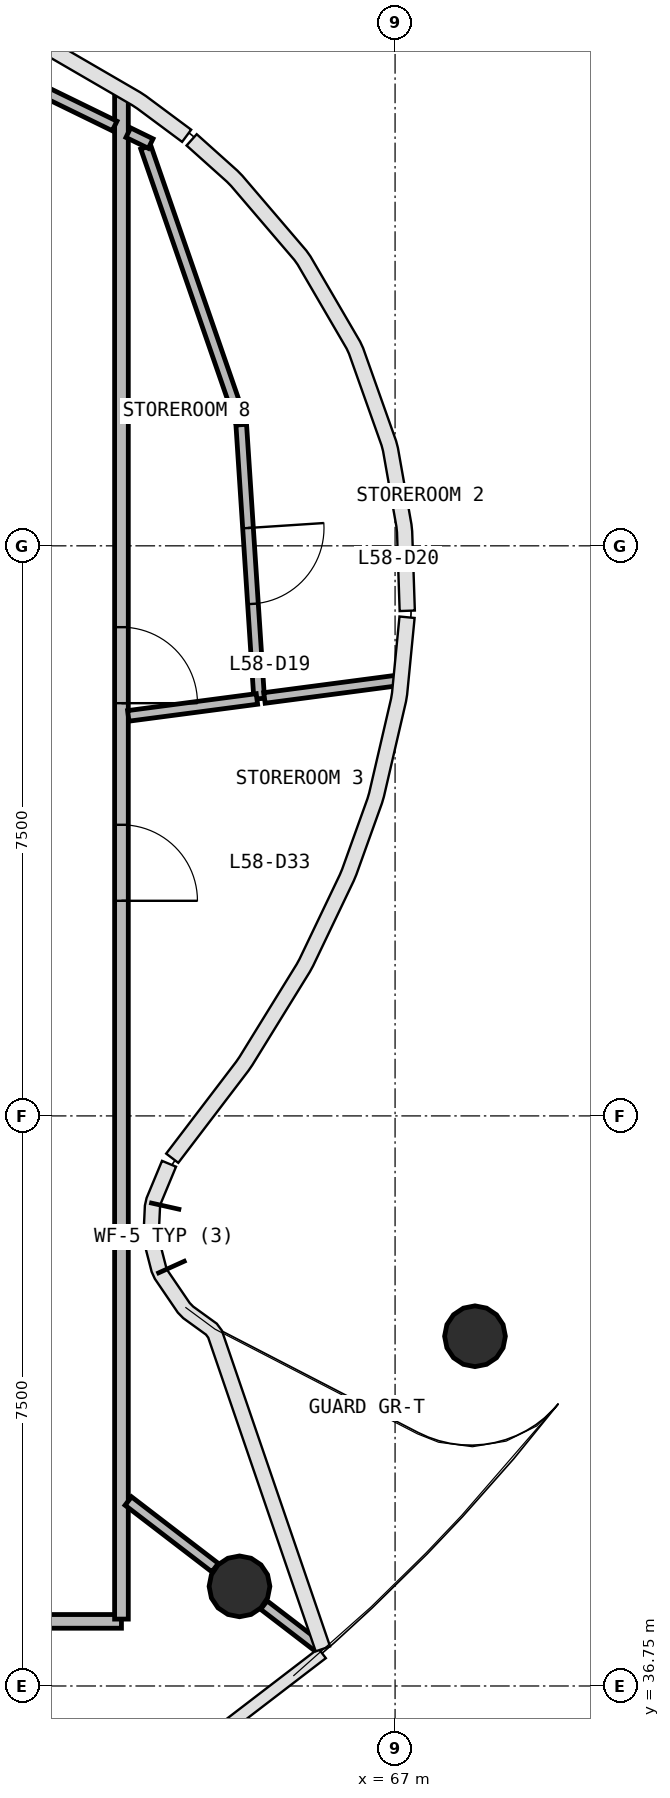
"""IFC4 building model, lengths in metres.
Left out: names, types, materials, properties, quantities, classifications, styles, units other than length and angle.
Written with IfcOpenShell. Run it as: python <this file> out.ifc"""

import sys

from ifc_helpers import new_model, si_unit, direction, frame, frame_2d, origin, origin_2d, place, context, subcontext, project, spatial, rectangle, circle, extrude, source, transform, mapped, element, fill, save


model = new_model("IFC4")
c1 = context("Model", 3, precision=1e-05, world=origin(), true_north=direction((0.0, 1.0)))
c2 = subcontext(c1, "Body", "Model", "MODEL_VIEW")
j1 = project(units=[si_unit("LENGTHUNIT", "METRE"), si_unit("PLANEANGLEUNIT", "RADIAN")], contexts=[c1])
p1 = place(None, origin())
s1 = spatial("IfcSite", under=j1, at=p1, CompositionType="ELEMENT")
p2 = place(p1, origin())
s2 = spatial("IfcBuilding", under=s1, at=p2, CompositionType="ELEMENT")
p3 = place(p2, frame((0.0, 0.0, 238.4)))
s3 = spatial("IfcBuildingStorey", under=s2, at=p3, CompositionType="ELEMENT", Elevation=238.4)
m1 = source(origin(), c2, "Body", "SweptSolid", [
    extrude(circle(Radius=0.4, at=origin_2d()), origin(), (0.0, 0.0, 1.0), 3.9),
])
for number, where, z_axis, x_axis in (
    (1, (64.953, 38.061, 0.0), (0.0, 0.0, 1.0), (1.0, 0.0, 0.0)),
    (2, (68.052, 41.351, 0.0), (0.0, 0.0, 1.0), (1.0, 0.0, 0.0)),
):
    element("IfcColumn", number, at=place(p3, frame(where, z_axis=z_axis, x_axis=x_axis)), inside=s3, PredefinedType="COLUMN", context=c2, shape_type="MappedRepresentation", body=[
        mapped(m1, transform((0.0, 0.0, 0.0), scale=1.0)),
    ])
p4 = place(p3, frame((63.4, 37.6, 0.0), z_axis=(0.0, 0.0, 1.0), x_axis=(-1.0, 0.0, 0.0)))
e3 = element("IfcWall", 3, at=p4, inside=s3, PredefinedType="PARTITIONING", context=c2, shape_type="SweptSolid", body=[
    extrude(rectangle(XDim=22.8, YDim=0.18, at=frame_2d((11.4, 0.0))), origin(), (0.0, 0.0, 1.0), 2.88),
])
p5 = place(p4, frame((12.95, 0.0, 0.0)))
e4 = element("IfcOpeningElement", 4, at=p5, cuts=e3, PredefinedType="OPENING", context=c2, shape_type="SweptSolid", body=[
    extrude(rectangle(XDim=1.0, YDim=2.1, at=frame_2d((0.5, 1.05))), frame((0.0, 0.1, 0.0), z_axis=(0.0, -1.0, 0.0), x_axis=(1.0, 0.0, 0.0)), (0.0, 0.0, 1.0), 0.2),
])
p6 = place(p4, frame((10.95, 0.0, 0.0)))
e5 = element("IfcOpeningElement", 5, at=p6, cuts=e3, PredefinedType="OPENING", context=c2, shape_type="SweptSolid", body=[
    extrude(rectangle(XDim=1.0, YDim=2.1, at=frame_2d((0.5, 1.05))), frame((0.0, 0.1, 0.0), z_axis=(0.0, -1.0, 0.0), x_axis=(1.0, 0.0, 0.0)), (0.0, 0.0, 1.0), 0.2),
])
p7 = place(p4, frame((5.75, 0.0, 0.0)))
e6 = element("IfcOpeningElement", 6, at=p7, cuts=e3, PredefinedType="OPENING", context=c2, shape_type="SweptSolid", body=[
    extrude(rectangle(XDim=1.0, YDim=2.1, at=frame_2d((0.5, 1.05))), frame((0.0, 0.1, 0.0), z_axis=(0.0, -1.0, 0.0), x_axis=(1.0, 0.0, 0.0)), (0.0, 0.0, 1.0), 0.2),
])
p8 = place(p3, frame((63.4, 57.687, 0.0), z_axis=(0.0, 0.0, 1.0), x_axis=(0.0, -1.0, 0.0)))
e7 = element("IfcWall", 7, at=p8, inside=s3, PredefinedType="PARTITIONING", context=c2, shape_type="SweptSolid", body=[
    extrude(rectangle(XDim=20.057, YDim=0.18, at=frame_2d((10.028, 0.0))), origin(), (0.0, 0.0, 1.0), 2.88),
])
p9 = place(p8, frame((7.007, 0.0, 0.0)))
e8 = element("IfcOpeningElement", 8, at=p9, cuts=e7, PredefinedType="OPENING", context=c2, shape_type="SweptSolid", body=[
    extrude(rectangle(XDim=1.0, YDim=2.1, at=frame_2d((0.5, 1.05))), frame((0.0, 0.1, 0.0), z_axis=(0.0, -1.0, 0.0), x_axis=(1.0, 0.0, 0.0)), (0.0, 0.0, 1.0), 0.2),
])
p10 = place(p8, frame((9.607, 0.0, 0.0)))
e9 = element("IfcOpeningElement", 9, at=p10, cuts=e7, PredefinedType="OPENING", context=c2, shape_type="SweptSolid", body=[
    extrude(rectangle(XDim=1.0, YDim=2.1, at=frame_2d((0.5, 1.05))), frame((0.0, 0.1, 0.0), z_axis=(0.0, -1.0, 0.0), x_axis=(1.0, 0.0, 0.0)), (0.0, 0.0, 1.0), 0.2),
])
p11 = place(p3, frame((64.974, 53.374, 0.0), z_axis=(0.0, 0.0, 1.0), x_axis=(-0.327353545352, 0.944901929486, 0.0)))
e10 = element("IfcWall", 10, at=p11, inside=s3, PredefinedType="PARTITIONING", context=c2, shape_type="SweptSolid", body=[
    extrude(rectangle(XDim=3.83, YDim=0.14, at=frame_2d((1.915, 0.0))), origin(), (0.0, 0.0, 1.0), 2.88),
])
p12 = place(p3, frame((64.976, 53.344, 0.0), z_axis=(0.0, 0.0, 1.0), x_axis=(0.065289819009, -0.997866343522, 0.0)))
e11 = element("IfcWall", 11, at=p12, inside=s3, PredefinedType="PARTITIONING", context=c2, shape_type="SweptSolid", body=[
    extrude(rectangle(XDim=3.612, YDim=0.14, at=frame_2d((1.806, 0.0))), origin(), (0.0, 0.0, 1.0), 2.88),
])
p13 = place(p12, frame((1.362, 0.0, 0.0)))
e12 = element("IfcOpeningElement", 12, at=p13, cuts=e11, PredefinedType="OPENING", context=c2, shape_type="SweptSolid", body=[
    extrude(rectangle(XDim=1.0, YDim=2.1, at=frame_2d((0.5, 1.05))), frame((0.0, 0.08, 0.0), z_axis=(0.0, -1.0, 0.0), x_axis=(1.0, 0.0, 0.0)), (0.0, 0.0, 1.0), 0.16),
])
p14 = place(p3, frame((63.31, 57.274, 0.0), z_axis=(0.0, 0.0, 1.0), x_axis=(-0.898704875961, 0.438553925903, 0.0)))
e13 = element("IfcWall", 13, at=p14, inside=s3, PredefinedType="PARTITIONING", context=c2, shape_type="SweptSolid", body=[
    extrude(rectangle(XDim=2.363, YDim=0.14, at=frame_2d((1.181, 0.0))), origin(), (0.0, 0.0, 1.0), 2.88),
])
p15 = place(p3, frame((65.281, 49.749, 0.0), z_axis=(0.0, 0.0, 1.0), x_axis=(0.991453349724, 0.130461700587, 0.0)))
e14 = element("IfcWall", 14, at=p15, inside=s3, PredefinedType="PARTITIONING", context=c2, shape_type="SweptSolid", body=[
    extrude(rectangle(XDim=1.757, YDim=0.14, at=frame_2d((0.879, 0.0))), origin(), (0.0, 0.0, 1.0), 2.88),
])
p16 = place(p3, frame((63.49, 49.513, 0.0), z_axis=(0.0, 0.0, 1.0), x_axis=(0.99143529695, 0.130598820677, 0.0)))
e15 = element("IfcWall", 15, at=p16, inside=s3, PredefinedType="PARTITIONING", context=c2, shape_type="SweptSolid", body=[
    extrude(rectangle(XDim=1.707, YDim=0.14, at=frame_2d((0.854, 0.0))), origin(), (0.0, 0.0, 1.0), 2.88),
])
p17 = place(p3, frame((63.49, 39.183, 0.0), z_axis=(0.0, 0.0, 1.0), x_axis=(0.793316945216, -0.608808857059, 0.0)))
e16 = element("IfcWall", 16, at=p17, inside=s3, PredefinedType="PARTITIONING", context=c2, shape_type="SweptSolid", body=[
    extrude(rectangle(XDim=1.44, YDim=0.14, at=frame_2d((0.72, 0.0))), origin(), (0.0, 0.0, 1.0), 2.88),
])
p18 = place(p3, frame((65.274, 37.814, 0.0), z_axis=(0.0, 0.0, 1.0), x_axis=(0.793377017635, -0.608730570851, 0.0)))
e17 = element("IfcWall", 17, at=p18, inside=s3, PredefinedType="PARTITIONING", context=c2, shape_type="SweptSolid", body=[
    extrude(rectangle(XDim=0.891, YDim=0.14, at=frame_2d((0.446, 0.0))), origin(), (0.0, 0.0, 1.0), 2.88),
])
p19 = place(p3, frame((63.784, 57.042, 0.0), z_axis=(0.0, 0.0, 1.0), x_axis=(-0.898711094884, 0.43854118157, 0.0)))
e18 = element("IfcWall", 18, at=p19, inside=s3, PredefinedType="PARTITIONING", context=c2, shape_type="SweptSolid", body=[
    extrude(rectangle(XDim=0.327, YDim=0.14, at=frame_2d((0.164, 0.0))), origin(), (0.0, 0.0, 1.0), 2.88),
])
m2 = source(origin(), c2, "Body", "SweptSolid", [
    extrude(rectangle(XDim=1.0, YDim=2.1, at=frame_2d((0.5, 1.05))), frame((0.0, 0.025, 0.0), z_axis=(0.0, -1.0, 0.0), x_axis=(1.0, 0.0, 0.0)), (0.0, 0.0, 1.0), 0.05),
])
p20 = place(p9, origin())
e19 = element("IfcDoor", 19, at=p20, inside=s3, OperationType="SINGLE_SWING_RIGHT", PredefinedType="DOOR", context=c2, shape_type="MappedRepresentation", body=[
    mapped(m2, transform((0.0, 0.0, 0.0), scale=1.0)),
])
fill(e8, e19)
p21 = place(p13, origin())
e20 = element("IfcDoor", 20, at=p21, inside=s3, OperationType="SINGLE_SWING_LEFT", PredefinedType="DOOR", context=c2, shape_type="MappedRepresentation", body=[
    mapped(m2, transform((0.0, 0.0, 0.0), scale=1.0)),
])
fill(e12, e20)
p22 = place(p10, origin())
e21 = element("IfcDoor", 21, at=p22, inside=s3, OperationType="SINGLE_SWING_RIGHT", PredefinedType="DOOR", context=c2, shape_type="MappedRepresentation", body=[
    mapped(m2, transform((0.0, 0.0, 0.0), scale=1.0)),
])
fill(e9, e21)
save(model, sys.argv[1])
